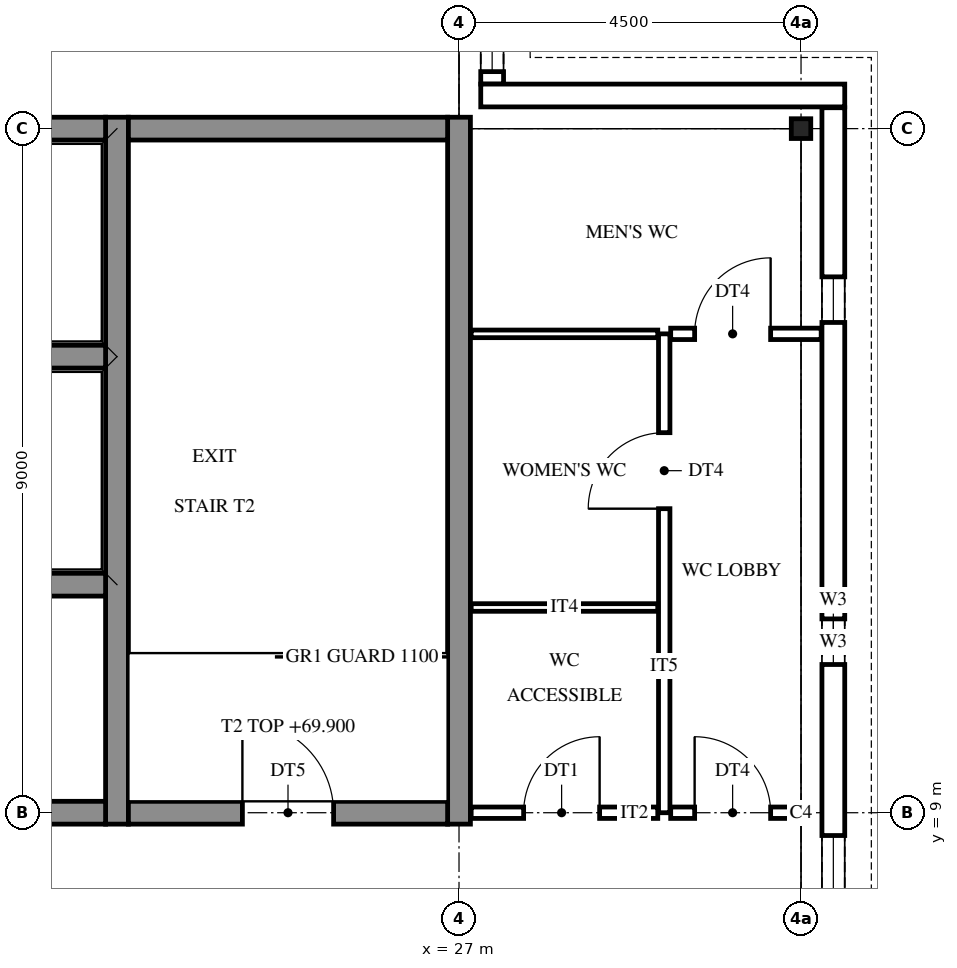
"""IFC4 building model, lengths in metres.
Left out: names, types, materials, properties, quantities, classifications, styles, units other than length and angle.
Written with IfcOpenShell. Run it as: python <this file> out.ifc"""

import sys

from ifc_helpers import new_model, si_unit, direction, frame, frame_2d, origin, origin_2d, place, context, subcontext, project, spatial, rectangle, i_section, extrude, element, fill, save


model = new_model("IFC4")
c1 = context("Model", 3, precision=1e-05, world=origin(), true_north=direction((0.0, 1.0)))
c2 = subcontext(c1, "Body", "Model", "MODEL_VIEW")
j1 = project(units=[si_unit("LENGTHUNIT", "METRE"), si_unit("PLANEANGLEUNIT", "RADIAN")], contexts=[c1])
p1 = place(None, origin())
s1 = spatial("IfcSite", under=j1, at=p1, CompositionType="ELEMENT")
p2 = place(p1, origin())
s2 = spatial("IfcBuilding", under=s1, at=p2, CompositionType="ELEMENT")
p3 = place(p2, frame((0.0, 0.0, 69.9)))
s3 = spatial("IfcBuildingStorey", under=s2, at=p3, CompositionType="ELEMENT", Elevation=69.9)
for number, where, z_axis, x_axis in (
    (1, (31.5, 9.0, 0.0), (0.0, 0.0, 1.0), (1.0, 0.0, 0.0)),
    (2, (31.5, 18.0, 0.0), (0.0, 0.0, 1.0), (1.0, 0.0, 0.0)),
):
    element("IfcColumn", number, at=place(p3, frame(where, z_axis=z_axis, x_axis=x_axis)), inside=s3, PredefinedType="COLUMN", context=c2, shape_type="SweptSolid", body=[
        extrude(i_section(OverallWidth=0.256, OverallDepth=0.26, WebThickness=0.01, FlangeThickness=0.017, FilletRadius=0.014, at=origin_2d()), origin(), (0.0, 0.0, 1.0), 4.5),
    ])
for number, where, z_axis, x_axis in (
    (3, (22.5, 8.85, 0.0), (0.0, 0.0, 1.0), (0.0, 1.0, 0.0)),
    (4, (27.0, 8.85, 0.0), (0.0, 0.0, 1.0), (0.0, 1.0, 0.0)),
):
    element("IfcWall", number, at=place(p3, frame(where, z_axis=z_axis, x_axis=x_axis)), inside=s3, PredefinedType="SHEAR", context=c2, shape_type="SweptSolid", body=[
        extrude(rectangle(XDim=9.3, YDim=0.3, at=frame_2d((4.65, 0.0))), origin(), (0.0, 0.0, 1.0), 4.5),
    ])
p4 = place(p3, frame((19.65, 9.0, 0.0), z_axis=(0.0, 0.0, 1.0), x_axis=(1.0, 0.0, 0.0)))
e5 = element("IfcWall", 5, at=p4, inside=s3, PredefinedType="SHEAR", context=c2, shape_type="SweptSolid", body=[
    extrude(rectangle(XDim=2.7, YDim=0.3, at=frame_2d((1.35, 0.0))), origin(), (0.0, 0.0, 1.0), 4.5),
])
p5 = place(p3, frame((22.65, 9.0, 0.0), z_axis=(0.0, 0.0, 1.0), x_axis=(1.0, 0.0, 0.0)))
e6 = element("IfcWall", 6, at=p5, inside=s3, PredefinedType="SHEAR", context=c2, shape_type="SweptSolid", body=[
    extrude(rectangle(XDim=4.2, YDim=0.3, at=frame_2d((2.1, 0.0))), origin(), (0.0, 0.0, 1.0), 4.5),
])
p6 = place(p5, frame((1.5, 0.0, 0.0)))
e7 = element("IfcOpeningElement", 7, at=p6, cuts=e6, PredefinedType="OPENING", context=c2, shape_type="SweptSolid", body=[
    extrude(rectangle(XDim=1.2, YDim=2.1, at=frame_2d((0.6, 1.05))), frame((0.0, 0.16, 0.0), z_axis=(0.0, -1.0, 0.0), x_axis=(1.0, 0.0, 0.0)), (0.0, 0.0, 1.0), 0.32),
])
for number, where, z_axis, x_axis in (
    (8, (19.65, 12.0, 0.0), (0.0, 0.0, 1.0), (1.0, 0.0, 0.0)),
    (9, (19.65, 15.0, 0.0), (0.0, 0.0, 1.0), (1.0, 0.0, 0.0)),
    (10, (19.65, 18.0, 0.0), (0.0, 0.0, 1.0), (1.0, 0.0, 0.0)),
):
    element("IfcWall", number, at=place(p3, frame(where, z_axis=z_axis, x_axis=x_axis)), inside=s3, PredefinedType="SHEAR", context=c2, shape_type="SweptSolid", body=[
        extrude(rectangle(XDim=2.7, YDim=0.3, at=frame_2d((1.35, 0.0))), origin(), (0.0, 0.0, 1.0), 4.5),
    ])
p7 = place(p3, frame((22.65, 18.0, 0.0), z_axis=(0.0, 0.0, 1.0), x_axis=(1.0, 0.0, 0.0)))
e11 = element("IfcWall", 11, at=p7, inside=s3, PredefinedType="SHEAR", context=c2, shape_type="SweptSolid", body=[
    extrude(rectangle(XDim=4.2, YDim=0.3, at=frame_2d((2.1, 0.0))), origin(), (0.0, 0.0, 1.0), 4.5),
])
p8 = place(p3, frame((27.436, 27.286, 0.0), z_axis=(0.0, 0.0, 1.0), x_axis=(0.0, -1.0, 0.0)))
e12 = element("IfcWall", 12, at=p8, inside=s3, PredefinedType="STANDARD", context=c2, shape_type="SweptSolid", body=[
    extrude(rectangle(XDim=8.7, YDim=0.3, at=frame_2d((4.35, 0.0))), origin(), (0.0, 0.0, 1.0), 4.5),
])
p9 = place(p8, frame((5.536, 0.0, 0.6)))
e13 = element("IfcOpeningElement", 13, at=p9, cuts=e12, PredefinedType="OPENING", context=c2, shape_type="SweptSolid", body=[
    extrude(rectangle(XDim=3.0, YDim=3.1, at=frame_2d((1.5, 1.55))), frame((0.0, 0.16, 0.0), z_axis=(0.0, -1.0, 0.0), x_axis=(1.0, 0.0, 0.0)), (0.0, 0.0, 1.0), 0.32),
])
p10 = place(p8, frame((1.036, 0.0, 0.6)))
e14 = element("IfcOpeningElement", 14, at=p10, cuts=e12, PredefinedType="OPENING", context=c2, shape_type="SweptSolid", body=[
    extrude(rectangle(XDim=3.0, YDim=3.1, at=frame_2d((1.5, 1.55))), frame((0.0, 0.16, 0.0), z_axis=(0.0, -1.0, 0.0), x_axis=(1.0, 0.0, 0.0)), (0.0, 0.0, 1.0), 0.32),
])
p11 = place(p3, frame((27.286, 18.436, 0.0), z_axis=(0.0, 0.0, 1.0), x_axis=(1.0, 0.0, 0.0)))
e15 = element("IfcWall", 15, at=p11, inside=s3, PredefinedType="STANDARD", context=c2, shape_type="SweptSolid", body=[
    extrude(rectangle(XDim=4.789, YDim=0.3, at=frame_2d((2.395, 0.0))), origin(), (0.0, 0.0, 1.0), 4.5),
])
p12 = place(p3, frame((31.925, 18.275, 0.0), z_axis=(0.0, 0.0, 1.0), x_axis=(0.0, -1.0, 0.0)))
e16 = element("IfcWall", 16, at=p12, inside=s3, PredefinedType="STANDARD", context=c2, shape_type="SweptSolid", body=[
    extrude(rectangle(XDim=18.55, YDim=0.3, at=frame_2d((9.275, 0.0))), origin(), (0.0, 0.0, 1.0), 4.5),
])
p13 = place(p12, frame((17.075, 0.0, 0.6)))
e17 = element("IfcOpeningElement", 17, at=p13, cuts=e16, PredefinedType="OPENING", context=c2, shape_type="SweptSolid", body=[
    extrude(rectangle(XDim=0.9, YDim=2.3, at=frame_2d((0.45, 1.15))), frame((0.0, 0.16, 0.0), z_axis=(0.0, -1.0, 0.0), x_axis=(1.0, 0.0, 0.0)), (0.0, 0.0, 1.0), 0.32),
])
p14 = place(p12, frame((9.575, 0.0, 0.6)))
e18 = element("IfcOpeningElement", 18, at=p14, cuts=e16, PredefinedType="OPENING", context=c2, shape_type="SweptSolid", body=[
    extrude(rectangle(XDim=0.9, YDim=2.3, at=frame_2d((0.45, 1.15))), frame((0.0, 0.16, 0.0), z_axis=(0.0, -1.0, 0.0), x_axis=(1.0, 0.0, 0.0)), (0.0, 0.0, 1.0), 0.32),
])
p15 = place(p12, frame((6.725, 0.0, 1.6)))
e19 = element("IfcOpeningElement", 19, at=p15, cuts=e16, PredefinedType="OPENING", context=c2, shape_type="SweptSolid", body=[
    extrude(rectangle(XDim=0.6, YDim=0.9, at=frame_2d((0.3, 0.45))), frame((0.0, 0.16, 0.0), z_axis=(0.0, -1.0, 0.0), x_axis=(1.0, 0.0, 0.0)), (0.0, 0.0, 1.0), 0.32),
])
p16 = place(p12, frame((2.225, 0.0, 1.6)))
e20 = element("IfcOpeningElement", 20, at=p16, cuts=e16, PredefinedType="OPENING", context=c2, shape_type="SweptSolid", body=[
    extrude(rectangle(XDim=0.6, YDim=0.9, at=frame_2d((0.3, 0.45))), frame((0.0, 0.16, 0.0), z_axis=(0.0, -1.0, 0.0), x_axis=(1.0, 0.0, 0.0)), (0.0, 0.0, 1.0), 0.32),
])
p17 = place(p3, frame((27.436, 27.286, 4.5), z_axis=(0.0, 0.0, 1.0), x_axis=(0.0, -1.0, 0.0)))
e21 = element("IfcWall", 21, at=p17, inside=s3, PredefinedType="PARAPET", context=c2, shape_type="SweptSolid", body=[
    extrude(rectangle(XDim=8.7, YDim=0.3, at=frame_2d((4.35, 0.0))), origin(), (0.0, 0.0, 1.0), 1.25),
])
p18 = place(p3, frame((27.286, 18.436, 4.5), z_axis=(0.0, 0.0, 1.0), x_axis=(1.0, 0.0, 0.0)))
e22 = element("IfcWall", 22, at=p18, inside=s3, PredefinedType="PARAPET", context=c2, shape_type="SweptSolid", body=[
    extrude(rectangle(XDim=4.789, YDim=0.3, at=frame_2d((2.395, 0.0))), origin(), (0.0, 0.0, 1.0), 1.25),
])
p19 = place(p3, frame((31.925, 18.275, 4.5), z_axis=(0.0, 0.0, 1.0), x_axis=(0.0, -1.0, 0.0)))
e23 = element("IfcWall", 23, at=p19, inside=s3, PredefinedType="PARAPET", context=c2, shape_type="SweptSolid", body=[
    extrude(rectangle(XDim=18.55, YDim=0.3, at=frame_2d((9.275, 0.0))), origin(), (0.0, 0.0, 1.0), 1.25),
])
p20 = place(p3, frame((29.7, 9.0, 0.0), z_axis=(0.0, 0.0, 1.0), x_axis=(0.0, 1.0, 0.0)))
e24 = element("IfcWall", 24, at=p20, inside=s3, PredefinedType="PARTITIONING", context=c2, shape_type="SweptSolid", body=[
    extrude(rectangle(XDim=6.3, YDim=0.15, at=frame_2d((3.15, 0.0))), origin(), (0.0, 0.0, 1.0), 3.822),
])
p21 = place(p20, frame((4.0, 0.0, 0.0)))
e25 = element("IfcOpeningElement", 25, at=p21, cuts=e24, PredefinedType="OPENING", context=c2, shape_type="SweptSolid", body=[
    extrude(rectangle(XDim=1.0, YDim=2.1, at=frame_2d((0.5, 1.05))), frame((0.0, 0.085, 0.0), z_axis=(0.0, -1.0, 0.0), x_axis=(1.0, 0.0, 0.0)), (0.0, 0.0, 1.0), 0.17),
])
p22 = place(p3, frame((27.16, 9.0, 0.0), z_axis=(0.0, 0.0, 1.0), x_axis=(1.0, 0.0, 0.0)))
e26 = element("IfcWall", 26, at=p22, inside=s3, PredefinedType="PARTITIONING", context=c2, shape_type="SweptSolid", body=[
    extrude(rectangle(XDim=2.455, YDim=0.15, at=frame_2d((1.228, 0.0))), origin(), (0.0, 0.0, 1.0), 3.822),
])
p23 = place(p22, frame((0.69, 0.0, 0.0)))
e27 = element("IfcOpeningElement", 27, at=p23, cuts=e26, PredefinedType="OPENING", context=c2, shape_type="SweptSolid", body=[
    extrude(rectangle(XDim=1.0, YDim=2.1, at=frame_2d((0.5, 1.05))), frame((0.0, 0.085, 0.0), z_axis=(0.0, -1.0, 0.0), x_axis=(1.0, 0.0, 0.0)), (0.0, 0.0, 1.0), 0.17),
])
p24 = place(p3, frame((29.785, 9.0, 0.0), z_axis=(0.0, 0.0, 1.0), x_axis=(1.0, 0.0, 0.0)))
e28 = element("IfcWall", 28, at=p24, inside=s3, PredefinedType="PARTITIONING", context=c2, shape_type="SweptSolid", body=[
    extrude(rectangle(XDim=1.577, YDim=0.15, at=frame_2d((0.789, 0.0))), origin(), (0.0, 0.0, 1.0), 3.822),
])
p25 = place(p24, frame((0.315, 0.0, 0.0)))
e29 = element("IfcOpeningElement", 29, at=p25, cuts=e28, PredefinedType="OPENING", context=c2, shape_type="SweptSolid", body=[
    extrude(rectangle(XDim=1.0, YDim=2.1, at=frame_2d((0.5, 1.05))), frame((0.0, 0.085, 0.0), z_axis=(0.0, -1.0, 0.0), x_axis=(1.0, 0.0, 0.0)), (0.0, 0.0, 1.0), 0.17),
])
for number, where, z_axis, x_axis in (
    (30, (27.16, 11.7, 0.0), (0.0, 0.0, 1.0), (1.0, 0.0, 0.0)),
    (31, (27.16, 15.3, 0.0), (0.0, 0.0, 1.0), (1.0, 0.0, 0.0)),
):
    element("IfcWall", number, at=place(p3, frame(where, z_axis=z_axis, x_axis=x_axis)), inside=s3, PredefinedType="PARTITIONING", context=c2, shape_type="SweptSolid", body=[
        extrude(rectangle(XDim=2.455, YDim=0.1, at=frame_2d((1.228, 0.0))), origin(), (0.0, 0.0, 1.0), 3.822),
    ])
p26 = place(p3, frame((29.785, 15.3, 0.0), z_axis=(0.0, 0.0, 1.0), x_axis=(1.0, 0.0, 0.0)))
e32 = element("IfcWall", 32, at=p26, inside=s3, PredefinedType="PARTITIONING", context=c2, shape_type="SweptSolid", body=[
    extrude(rectangle(XDim=1.98, YDim=0.15, at=frame_2d((0.99, 0.0))), origin(), (0.0, 0.0, 1.0), 3.822),
])
p27 = place(p26, frame((0.315, 0.0, 0.0)))
e33 = element("IfcOpeningElement", 33, at=p27, cuts=e32, PredefinedType="OPENING", context=c2, shape_type="SweptSolid", body=[
    extrude(rectangle(XDim=1.0, YDim=2.1, at=frame_2d((0.5, 1.05))), frame((0.0, 0.085, 0.0), z_axis=(0.0, -1.0, 0.0), x_axis=(1.0, 0.0, 0.0)), (0.0, 0.0, 1.0), 0.17),
])
p28 = place(p3, frame((22.5, 8.85, 4.5), z_axis=(0.0, 0.0, 1.0), x_axis=(0.0, 1.0, 0.0)))
e34 = element("IfcWall", 34, at=p28, inside=s3, PredefinedType="SOLIDWALL", context=c2, shape_type="SweptSolid", body=[
    extrude(rectangle(XDim=9.3, YDim=0.3, at=frame_2d((4.65, 0.0))), origin(), (0.0, 0.0, 1.0), 4.5),
])
for number, where, z_axis, x_axis in (
    (35, (19.65, 9.0, 4.5), (0.0, 0.0, 1.0), (1.0, 0.0, 0.0)),
    (36, (19.65, 12.0, 4.5), (0.0, 0.0, 1.0), (1.0, 0.0, 0.0)),
    (37, (19.65, 15.0, 4.5), (0.0, 0.0, 1.0), (1.0, 0.0, 0.0)),
    (38, (19.65, 18.0, 4.5), (0.0, 0.0, 1.0), (1.0, 0.0, 0.0)),
):
    element("IfcWall", number, at=place(p3, frame(where, z_axis=z_axis, x_axis=x_axis)), inside=s3, PredefinedType="SOLIDWALL", context=c2, shape_type="SweptSolid", body=[
        extrude(rectangle(XDim=2.7, YDim=0.3, at=frame_2d((1.35, 0.0))), origin(), (0.0, 0.0, 1.0), 4.5),
    ])
p29 = place(p9, origin())
e39 = element("IfcWindow", 39, at=p29, inside=s3, PartitioningType="SINGLE_PANEL", PredefinedType="WINDOW", context=c2, shape_type="SweptSolid", body=[
    extrude(rectangle(XDim=3.0, YDim=3.1, at=frame_2d((1.5, 1.55))), frame((0.0, 0.03, 0.0), z_axis=(0.0, -1.0, 0.0), x_axis=(1.0, 0.0, 0.0)), (0.0, 0.0, 1.0), 0.06),
])
fill(e13, e39)
p30 = place(p14, origin())
e40 = element("IfcWindow", 40, at=p30, inside=s3, PartitioningType="SINGLE_PANEL", PredefinedType="WINDOW", context=c2, shape_type="SweptSolid", body=[
    extrude(rectangle(XDim=0.9, YDim=2.3, at=frame_2d((0.45, 1.15))), frame((0.0, 0.03, 0.0), z_axis=(0.0, -1.0, 0.0), x_axis=(1.0, 0.0, 0.0)), (0.0, 0.0, 1.0), 0.06),
])
fill(e18, e40)
p31 = place(p15, origin())
e41 = element("IfcWindow", 41, at=p31, inside=s3, PartitioningType="SINGLE_PANEL", PredefinedType="WINDOW", context=c2, shape_type="SweptSolid", body=[
    extrude(rectangle(XDim=0.6, YDim=0.9, at=frame_2d((0.3, 0.45))), frame((0.0, 0.03, 0.0), z_axis=(0.0, -1.0, 0.0), x_axis=(1.0, 0.0, 0.0)), (0.0, 0.0, 1.0), 0.06),
])
fill(e19, e41)
p32 = place(p16, origin())
e42 = element("IfcWindow", 42, at=p32, inside=s3, PartitioningType="SINGLE_PANEL", PredefinedType="WINDOW", context=c2, shape_type="SweptSolid", body=[
    extrude(rectangle(XDim=0.6, YDim=0.9, at=frame_2d((0.3, 0.45))), frame((0.0, 0.03, 0.0), z_axis=(0.0, -1.0, 0.0), x_axis=(1.0, 0.0, 0.0)), (0.0, 0.0, 1.0), 0.06),
])
fill(e20, e42)
p33 = place(p6, origin())
e43 = element("IfcDoor", 43, at=p33, inside=s3, OperationType="SINGLE_SWING_LEFT", PredefinedType="DOOR", context=c2, shape_type="SweptSolid", body=[
    extrude(rectangle(XDim=1.2, YDim=2.1, at=frame_2d((0.6, 1.05))), frame((0.0, 0.025, 0.0), z_axis=(0.0, -1.0, 0.0), x_axis=(1.0, 0.0, 0.0)), (0.0, 0.0, 1.0), 0.05),
])
fill(e7, e43)
p34 = place(p23, origin())
e44 = element("IfcDoor", 44, at=p34, inside=s3, OperationType="SINGLE_SWING_RIGHT", PredefinedType="DOOR", context=c2, shape_type="SweptSolid", body=[
    extrude(rectangle(XDim=1.0, YDim=2.1, at=frame_2d((0.5, 1.05))), frame((0.0, 0.025, 0.0), z_axis=(0.0, -1.0, 0.0), x_axis=(1.0, 0.0, 0.0)), (0.0, 0.0, 1.0), 0.05),
])
fill(e27, e44)
p35 = place(p21, origin())
e45 = element("IfcDoor", 45, at=p35, inside=s3, OperationType="SINGLE_SWING_LEFT", PredefinedType="DOOR", context=c2, shape_type="SweptSolid", body=[
    extrude(rectangle(XDim=1.0, YDim=2.1, at=frame_2d((0.5, 1.05))), frame((0.0, 0.025, 0.0), z_axis=(0.0, -1.0, 0.0), x_axis=(1.0, 0.0, 0.0)), (0.0, 0.0, 1.0), 0.05),
])
fill(e25, e45)
p36 = place(p27, origin())
e46 = element("IfcDoor", 46, at=p36, inside=s3, OperationType="SINGLE_SWING_RIGHT", PredefinedType="DOOR", context=c2, shape_type="SweptSolid", body=[
    extrude(rectangle(XDim=1.0, YDim=2.1, at=frame_2d((0.5, 1.05))), frame((0.0, 0.025, 0.0), z_axis=(0.0, -1.0, 0.0), x_axis=(1.0, 0.0, 0.0)), (0.0, 0.0, 1.0), 0.05),
])
fill(e33, e46)
p37 = place(p25, origin())
e47 = element("IfcDoor", 47, at=p37, inside=s3, OperationType="SINGLE_SWING_LEFT", PredefinedType="DOOR", context=c2, shape_type="SweptSolid", body=[
    extrude(rectangle(XDim=1.0, YDim=2.1, at=frame_2d((0.5, 1.05))), frame((0.0, 0.025, 0.0), z_axis=(0.0, -1.0, 0.0), x_axis=(1.0, 0.0, 0.0)), (0.0, 0.0, 1.0), 0.05),
])
fill(e29, e47)
save(model, sys.argv[1])
